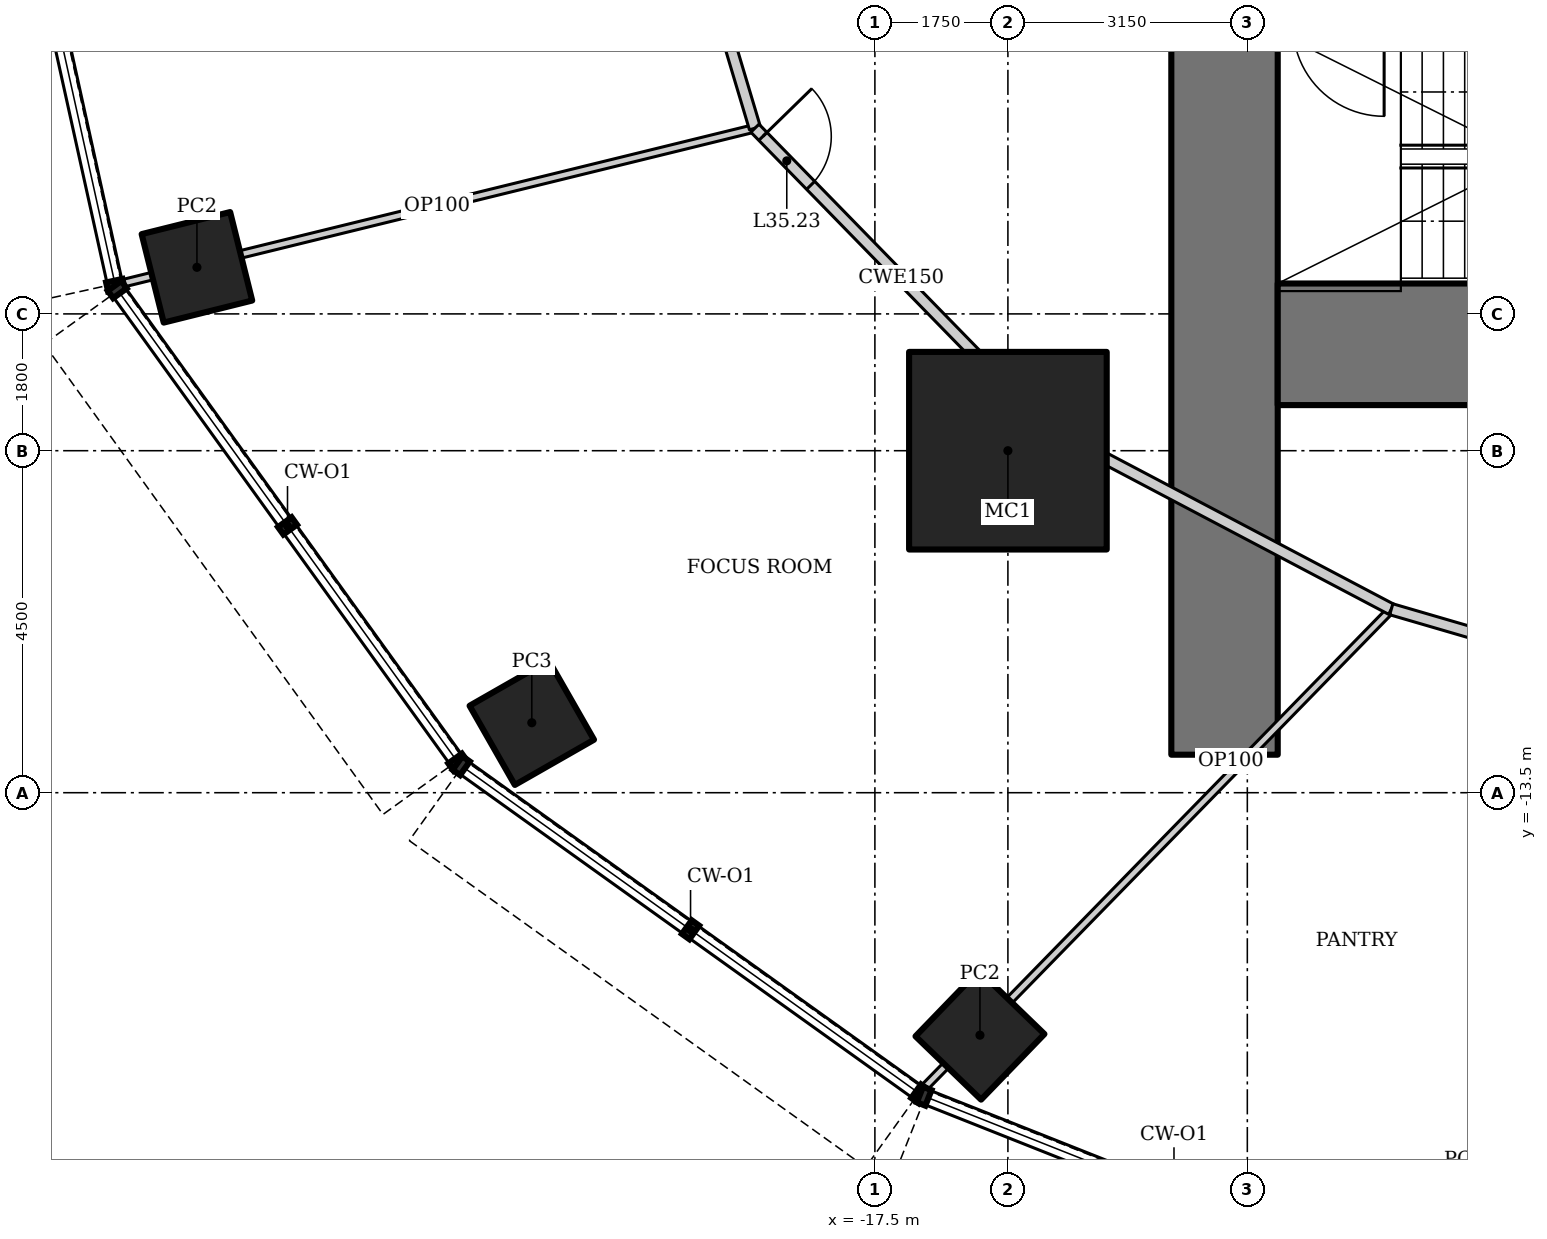
"""IFC4 building model, lengths in metres.
Left out: names, types, materials, properties, quantities, classifications, styles, units other than length and angle.
Written with IfcOpenShell. Run it as: python <this file> out.ifc"""

import sys

from ifc_helpers import new_model, si_unit, direction, frame, frame_2d, origin, origin_2d, place, context, subcontext, project, spatial, rectangle, hollow_rectangle, extrude, element, fill, save


model = new_model("IFC4")
c1 = context("Model", 3, precision=1e-05, world=origin(), true_north=direction((0.0, 1.0)))
c2 = subcontext(c1, "Body", "Model", "MODEL_VIEW")
j1 = project(units=[si_unit("LENGTHUNIT", "METRE"), si_unit("PLANEANGLEUNIT", "RADIAN")], contexts=[c1])
p1 = place(None, origin())
s1 = spatial("IfcSite", under=j1, at=p1, CompositionType="ELEMENT")
p2 = place(p1, origin())
s2 = spatial("IfcBuilding", under=s1, at=p2, CompositionType="ELEMENT")
p3 = place(p2, frame((0.0, 0.0, 151.0)))
s3 = spatial("IfcBuildingStorey", under=s2, at=p3, CompositionType="ELEMENT", Elevation=151.0)
p4 = place(p3, frame((-15.75, -9.0, 0.0), z_axis=(0.0, 0.0, 1.0), x_axis=(1.0, 0.0, 0.0)))
e1 = element("IfcColumn", 1, at=p4, inside=s3, PredefinedType="COLUMN", context=c2, shape_type="SweptSolid", body=[
    extrude(hollow_rectangle(XDim=2.6, YDim=2.6, WallThickness=0.13, at=origin_2d()), origin(), (0.0, 0.0, 1.0), 4.2),
])
p5 = place(p3, frame((-26.42, -6.587, 0.0), z_axis=(0.0, 0.0, 1.0), x_axis=(0.970295726276, 0.2419218956, 0.0)))
e2 = element("IfcColumn", 2, at=p5, inside=s3, PredefinedType="COLUMN", context=c2, shape_type="SweptSolid", body=[
    extrude(hollow_rectangle(XDim=1.2, YDim=1.2, WallThickness=0.1, at=origin_2d()), origin(), (0.0, 0.0, 1.0), 4.2),
])
p6 = place(p3, frame((-22.014, -12.579, 0.0), z_axis=(0.0, 0.0, 1.0), x_axis=(0.86824298017, 0.496139221777, 0.0)))
e3 = element("IfcColumn", 3, at=p6, inside=s3, PredefinedType="COLUMN", context=c2, shape_type="SweptSolid", body=[
    extrude(hollow_rectangle(XDim=1.2, YDim=1.2, WallThickness=0.12, at=origin_2d()), origin(), (0.0, 0.0, 1.0), 4.2),
])
for number, where, z_axis, x_axis in (
    (4, (-16.118, -16.69, 0.0), (0.0, 0.0, 1.0), (0.695, 0.719, 0.0)),
    (5, (-9.749, -19.133, 0.0), (0.0, 0.0, 1.0), (0.454, 0.891, 0.0)),
):
    element("IfcColumn", number, at=place(p3, frame(where, z_axis=z_axis, x_axis=x_axis)), inside=s3, PredefinedType="COLUMN", context=c2, shape_type="SweptSolid", body=[
        extrude(hollow_rectangle(XDim=1.2, YDim=1.2, WallThickness=0.1, at=origin_2d()), origin(), (0.0, 0.0, 1.0), 4.2),
    ])
p7 = place(p3, frame((-12.9, 13.0, 0.0), z_axis=(0.0, 0.0, 1.0), x_axis=(0.0, -1.0, 0.0)))
e6 = element("IfcWall", 6, at=p7, inside=s3, PredefinedType="SHEAR", context=c2, shape_type="SweptSolid", body=[
    extrude(rectangle(XDim=26.0, YDim=1.4, at=frame_2d((13.0, 0.0))), origin(), (0.0, 0.0, 1.0), 4.2),
])
p8 = place(p7, frame((12.1, 0.0, 0.0)))
e7 = element("IfcOpeningElement", 7, at=p8, cuts=e6, PredefinedType="OPENING", context=c2, shape_type="SweptSolid", body=[
    extrude(rectangle(XDim=1.8, YDim=2.1, at=frame_2d((0.9, 1.05))), frame((0.0, 0.71, 0.0), z_axis=(0.0, -1.0, 0.0), x_axis=(1.0, 0.0, 0.0)), (0.0, 0.0, 1.0), 1.42),
])
p9 = place(p3, frame((-12.2, -7.6, 0.0), z_axis=(0.0, 0.0, 1.0), x_axis=(1.0, 0.0, 0.0)))
e8 = element("IfcWall", 8, at=p9, inside=s3, PredefinedType="SHEAR", context=c2, shape_type="SweptSolid", body=[
    extrude(rectangle(XDim=24.4, YDim=1.6, at=frame_2d((12.2, 0.0))), origin(), (0.0, 0.0, 1.0), 4.2),
])
p10 = place(p3, frame((-27.441, -6.809, 0.0), z_axis=(0.0, 0.0, 1.0), x_axis=(0.971187445787, 0.238316900673, 0.0)))
e9 = element("IfcWall", 9, at=p10, inside=s3, PredefinedType="PARTITIONING", context=c2, shape_type="SweptSolid", body=[
    extrude(rectangle(XDim=8.61, YDim=0.1, at=frame_2d((4.305, 0.0))), origin(), (0.0, 0.0, 1.0), 3.113),
])
p11 = place(p3, frame((-16.882, -17.414, 0.0), z_axis=(0.0, 0.0, 1.0), x_axis=(0.698509457669, 0.715600822769, 0.0)))
e10 = element("IfcWall", 10, at=p11, inside=s3, PredefinedType="PARTITIONING", context=c2, shape_type="SweptSolid", body=[
    extrude(rectangle(XDim=8.842, YDim=0.1, at=frame_2d((4.421, 0.0))), origin(), (0.0, 0.0, 1.0), 3.321),
])
p12 = place(p3, frame((-10.253, -20.052, 0.0), z_axis=(0.0, 0.0, 1.0), x_axis=(0.457326298316, 0.88929896934, 0.0)))
e11 = element("IfcWall", 11, at=p12, inside=s3, PredefinedType="PARTITIONING", context=c2, shape_type="SweptSolid", body=[
    extrude(rectangle(XDim=8.638, YDim=0.1, at=frame_2d((4.319, 0.0))), origin(), (0.0, 0.0, 1.0), 3.349),
])
p13 = place(p3, frame((-20.5, 0.0, 0.0), z_axis=(0.0, 0.0, 1.0), x_axis=(0.286346182056, -0.958126225516, 0.0)))
e12 = element("IfcWall", 12, at=p13, inside=s3, PredefinedType="PARTITIONING", context=c2, shape_type="SweptSolid", body=[
    extrude(rectangle(XDim=4.965, YDim=0.15, at=frame_2d((2.482, 0.0))), origin(), (0.0, 0.0, 1.0), 4.05),
])
p14 = place(p3, frame((-19.078, -4.757, 0.0), z_axis=(0.0, 0.0, 1.0), x_axis=(0.698305033542, -0.715800307439, 0.0)))
e13 = element("IfcWall", 13, at=p14, inside=s3, PredefinedType="PARTITIONING", context=c2, shape_type="SweptSolid", body=[
    extrude(rectangle(XDim=5.512, YDim=0.15, at=frame_2d((2.756, 0.0))), origin(), (0.0, 0.0, 1.0), 4.05),
])
p15 = place(p14, frame((0.15, 0.0, 0.0)))
e14 = element("IfcOpeningElement", 14, at=p15, cuts=e13, PredefinedType="OPENING", context=c2, shape_type="SweptSolid", body=[
    extrude(rectangle(XDim=0.9, YDim=2.1, at=frame_2d((0.45, 1.05))), frame((0.0, 0.085, 0.0), z_axis=(0.0, -1.0, 0.0), x_axis=(1.0, 0.0, 0.0)), (0.0, 0.0, 1.0), 0.17),
])
p16 = place(p3, frame((-15.229, -8.702, 0.0), z_axis=(0.0, 0.0, 1.0), x_axis=(0.884643590306, -0.466267860924, 0.0)))
e15 = element("IfcWall", 15, at=p16, inside=s3, PredefinedType="PARTITIONING", context=c2, shape_type="SweptSolid", body=[
    extrude(rectangle(XDim=5.113, YDim=0.15, at=frame_2d((2.557, 0.0))), origin(), (0.0, 0.0, 1.0), 4.05),
])
p17 = place(p3, frame((-10.706, -11.086, 0.0), z_axis=(0.0, 0.0, 1.0), x_axis=(0.96001728753, -0.279940721659, 0.0)))
e16 = element("IfcWall", 16, at=p17, inside=s3, PredefinedType="PARTITIONING", context=c2, shape_type="SweptSolid", body=[
    extrude(rectangle(XDim=4.586, YDim=0.15, at=frame_2d((2.293, 0.0))), origin(), (0.0, 0.0, 1.0), 4.05),
])
p18 = place(p17, frame((1.843, 0.0, 0.0)))
e17 = element("IfcOpeningElement", 17, at=p18, cuts=e16, PredefinedType="OPENING", context=c2, shape_type="SweptSolid", body=[
    extrude(rectangle(XDim=0.9, YDim=2.1, at=frame_2d((0.45, 1.05))), frame((0.0, 0.085, 0.0), z_axis=(0.0, -1.0, 0.0), x_axis=(1.0, 0.0, 0.0)), (0.0, 0.0, 1.0), 0.17),
])
p19 = place(p3, frame((-12.9, -13.0, 0.0), z_axis=(0.0, 0.0, 1.0), x_axis=(0.715424812506, -0.698689729172, 0.0)))
e18 = element("IfcWall", 18, at=p19, inside=s3, PredefinedType="PARTITIONING", context=c2, shape_type="SweptSolid", body=[
    extrude(rectangle(XDim=0.233, YDim=0.1, at=frame_2d((0.117, 0.0))), origin(), (0.0, 0.0, 1.0), 4.05),
])
p20 = place(p15, origin())
e19 = element("IfcDoor", 19, at=p20, inside=s3, OperationType="SINGLE_SWING_LEFT", PredefinedType="DOOR", context=c2, shape_type="SweptSolid", body=[
    extrude(rectangle(XDim=0.9, YDim=2.1, at=frame_2d((0.45, 1.05))), frame((0.0, 0.025, 0.0), z_axis=(0.0, -1.0, 0.0), x_axis=(1.0, 0.0, 0.0)), (0.0, 0.0, 1.0), 0.05),
])
fill(e14, e19)
save(model, sys.argv[1])
